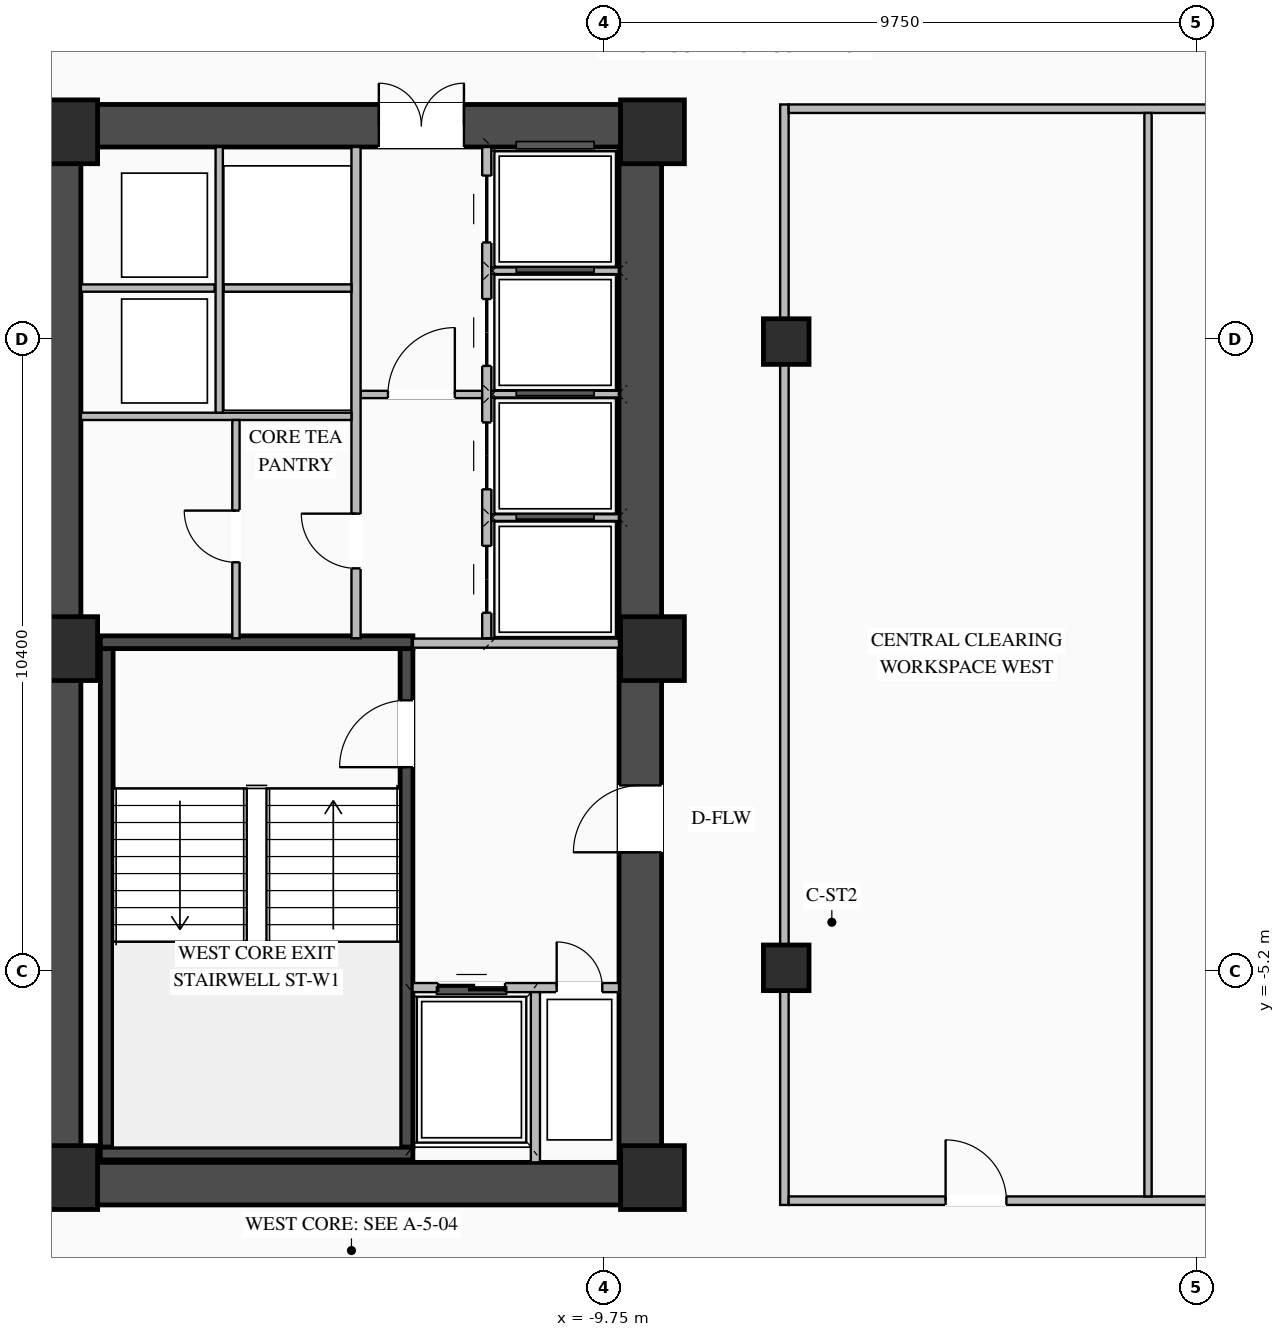
"""IFC4 building model, lengths in metres.
Left out: names, types, materials, properties, quantities, classifications, styles, units other than length and angle.
Written with IfcOpenShell. Run it as: python <this file> out.ifc"""

import sys

from ifc_helpers import new_model, si_unit, direction, frame, frame_2d, origin, origin_2d, place, context, subcontext, project, spatial, rectangle, i_section, extrude, element, fill, save


model = new_model("IFC4")
c1 = context("Model", 3, precision=1e-05, world=origin(), true_north=direction((0.0, 1.0)))
c2 = subcontext(c1, "Body", "Model", "MODEL_VIEW")
j1 = project(units=[si_unit("LENGTHUNIT", "METRE"), si_unit("PLANEANGLEUNIT", "RADIAN")], contexts=[c1])
p1 = place(None, origin())
s1 = spatial("IfcSite", under=j1, at=p1, CompositionType="ELEMENT")
p2 = place(p1, origin())
s2 = spatial("IfcBuilding", under=s1, at=p2, CompositionType="ELEMENT")
p3 = place(p2, frame((0.0, 0.0, 84.55)))
s3 = spatial("IfcBuildingStorey", under=s2, at=p3, CompositionType="ELEMENT", Elevation=84.55)
p4 = place(p3, frame((-19.05, -8.7, 0.0), z_axis=(0.0, 0.0, 1.0), x_axis=(1.0, 0.0, 0.0)))
e1 = element("IfcWall", 1, at=p4, inside=s3, PredefinedType="SHEAR", context=c2, shape_type="SweptSolid", body=[
    extrude(rectangle(XDim=10.25, YDim=0.7, at=frame_2d((5.125, 0.0))), origin(), (0.0, 0.0, 1.0), 3.27),
])
p5 = place(p3, frame((-19.05, 8.7, 0.0), z_axis=(0.0, 0.0, 1.0), x_axis=(1.0, 0.0, 0.0)))
e2 = element("IfcWall", 2, at=p5, inside=s3, PredefinedType="SHEAR", context=c2, shape_type="SweptSolid", body=[
    extrude(rectangle(XDim=10.25, YDim=0.7, at=frame_2d((5.125, 0.0))), origin(), (0.0, 0.0, 1.0), 3.27),
])
p6 = place(p5, frame((5.6, 0.0, 0.0)))
e3 = element("IfcOpeningElement", 3, at=p6, cuts=e2, PredefinedType="OPENING", context=c2, shape_type="SweptSolid", body=[
    extrude(rectangle(XDim=1.4, YDim=2.05, at=frame_2d((0.7, 1.025))), frame((0.0, 0.36, 0.0), z_axis=(0.0, -1.0, 0.0), x_axis=(1.0, 0.0, 0.0)), (0.0, 0.0, 1.0), 0.72),
])
p7 = place(p3, frame((-18.7, -8.35, 0.0), z_axis=(0.0, 0.0, 1.0), x_axis=(0.0, 1.0, 0.0)))
e4 = element("IfcWall", 4, at=p7, inside=s3, PredefinedType="SHEAR", context=c2, shape_type="SweptSolid", body=[
    extrude(rectangle(XDim=16.7, YDim=0.7, at=frame_2d((8.35, 0.0))), origin(), (0.0, 0.0, 1.0), 3.27),
])
p8 = place(p3, frame((-9.15, -8.35, 0.0), z_axis=(0.0, 0.0, 1.0), x_axis=(0.0, 1.0, 0.0)))
e5 = element("IfcWall", 5, at=p8, inside=s3, PredefinedType="SHEAR", context=c2, shape_type="SweptSolid", body=[
    extrude(rectangle(XDim=16.7, YDim=0.7, at=frame_2d((8.35, 0.0))), origin(), (0.0, 0.0, 1.0), 3.27),
])
p9 = place(p8, frame((5.1, 0.0, 0.0)))
e6 = element("IfcOpeningElement", 6, at=p9, cuts=e5, PredefinedType="OPENING", context=c2, shape_type="SweptSolid", body=[
    extrude(rectangle(XDim=1.1, YDim=2.08, at=frame_2d((0.55, 1.04))), frame((0.0, 0.36, 0.0), z_axis=(0.0, -1.0, 0.0), x_axis=(1.0, 0.0, 0.0)), (0.0, 0.0, 1.0), 0.72),
])
p10 = place(p3, frame((-12.995, -8.1, 0.0), z_axis=(0.0, 0.0, 1.0), x_axis=(0.0, 1.0, 0.0)))
e7 = element("IfcWall", 7, at=p10, inside=s3, PredefinedType="SHEAR", context=c2, shape_type="SweptSolid", body=[
    extrude(rectangle(XDim=8.2, YDim=0.21, at=frame_2d((4.1, 0.0))), origin(), (0.0, 0.0, 1.0), 3.27),
])
p11 = place(p10, frame((6.25, 0.0, 0.0)))
e8 = element("IfcOpeningElement", 8, at=p11, cuts=e7, PredefinedType="OPENING", context=c2, shape_type="SweptSolid", body=[
    extrude(rectangle(XDim=1.1, YDim=2.15, at=frame_2d((0.55, 1.075))), frame((0.0, 0.115, 0.0), z_axis=(0.0, -1.0, 0.0), x_axis=(1.0, 0.0, 0.0)), (0.0, 0.0, 1.0), 0.23),
])
p12 = place(p3, frame((-17.925, -8.1, 0.0), z_axis=(0.0, 0.0, 1.0), x_axis=(0.0, 1.0, 0.0)))
e9 = element("IfcWall", 9, at=p12, inside=s3, PredefinedType="SHEAR", context=c2, shape_type="SweptSolid", body=[
    extrude(rectangle(XDim=8.2, YDim=0.21, at=frame_2d((4.1, 0.0))), origin(), (0.0, 0.0, 1.0), 3.27),
])
for number, where, z_axis, x_axis in (
    (10, (-18.03, -8.205, 0.0), (0.0, 0.0, 1.0), (1.0, 0.0, 0.0)),
    (11, (-12.89, 0.205, 0.0), (0.0, 0.0, 1.0), (-1.0, 0.0, 0.0)),
):
    element("IfcWall", number, at=place(p3, frame(where, z_axis=z_axis, x_axis=x_axis)), inside=s3, PredefinedType="SHEAR", context=c2, shape_type="SweptSolid", body=[
        extrude(rectangle(XDim=5.14, YDim=0.21, at=frame_2d((2.57, 0.0))), origin(), (0.0, 0.0, 1.0), 3.27),
    ])
for number, where, z_axis, x_axis in (
    (12, (-8.95, -8.6, 0.0), (0.0, 0.0, 1.0), (1.0, 0.0, 0.0)),
    (13, (-8.95, 0.1, 0.0), (0.0, 0.0, 1.0), (1.0, 0.0, 0.0)),
    (14, (-8.95, 8.6, 0.0), (0.0, 0.0, 1.0), (1.0, 0.0, 0.0)),
    (15, (-18.6, -8.6, 0.0), (0.0, 0.0, 1.0), (1.0, 0.0, 0.0)),
    (16, (-18.6, 0.1, 0.0), (0.0, 0.0, 1.0), (1.0, 0.0, 0.0)),
    (17, (-18.6, 8.6, 0.0), (0.0, 0.0, 1.0), (1.0, 0.0, 0.0)),
):
    element("IfcColumn", number, at=place(p3, frame(where, z_axis=z_axis, x_axis=x_axis)), inside=s3, PredefinedType="COLUMN", context=c2, shape_type="SweptSolid", body=[
        extrude(rectangle(XDim=1.05, YDim=1.05, at=origin_2d()), origin(), (0.0, 0.0, 1.0), 3.45),
    ])
for number, where, z_axis, x_axis in (
    (18, (-6.75, -5.15, 0.0), (0.0, 0.0, 1.0), (1.0, 0.0, 0.0)),
    (19, (-6.75, 5.15, 0.0), (0.0, 0.0, 1.0), (1.0, 0.0, 0.0)),
):
    element("IfcColumn", number, at=place(p3, frame(where, z_axis=z_axis, x_axis=x_axis)), inside=s3, PredefinedType="COLUMN", context=c2, shape_type="SweptSolid", body=[
        extrude(i_section(OverallWidth=0.75, OverallDepth=0.75, WebThickness=0.03, FlangeThickness=0.044, at=origin_2d()), origin(), (0.0, 0.0, 1.0), 3.45),
    ])
p13 = place(p3, frame((-12.895, -5.475, 0.0), z_axis=(0.0, 0.0, 1.0), x_axis=(1.0, 0.0, 0.0)))
e20 = element("IfcWall", 20, at=p13, inside=s3, PredefinedType="STANDARD", context=c2, shape_type="SweptSolid", body=[
    extrude(rectangle(XDim=3.395, YDim=0.15, at=frame_2d((1.698, 0.0))), origin(), (0.0, 0.0, 1.0), 3.25),
])
p14 = place(p13, frame((0.42, 0.0, 0.0)))
e21 = element("IfcOpeningElement", 21, at=p14, cuts=e20, PredefinedType="OPENING", context=c2, shape_type="SweptSolid", body=[
    extrude(rectangle(XDim=1.1, YDim=2.15, at=frame_2d((0.55, 1.075))), frame((0.0, 0.085, 0.0), z_axis=(0.0, -1.0, 0.0), x_axis=(1.0, 0.0, 0.0)), (0.0, 0.0, 1.0), 0.17),
])
p15 = place(p13, frame((2.37, 0.0, 0.0)))
e22 = element("IfcOpeningElement", 22, at=p15, cuts=e20, PredefinedType="OPENING", context=c2, shape_type="SweptSolid", body=[
    extrude(rectangle(XDim=0.75, YDim=2.05, at=frame_2d((0.375, 1.025))), frame((0.0, 0.085, 0.0), z_axis=(0.0, -1.0, 0.0), x_axis=(1.0, 0.0, 0.0)), (0.0, 0.0, 1.0), 0.17),
])
p16 = place(p3, frame((-10.875, -8.35, 0.0), z_axis=(0.0, 0.0, 1.0), x_axis=(0.0, 1.0, 0.0)))
e23 = element("IfcWall", 23, at=p16, inside=s3, PredefinedType="STANDARD", context=c2, shape_type="SweptSolid", body=[
    extrude(rectangle(XDim=2.8, YDim=0.15, at=frame_2d((1.4, 0.0))), origin(), (0.0, 0.0, 1.0), 3.25),
])
p17 = place(p3, frame((-12.89, 0.19, 0.0), z_axis=(0.0, 0.0, 1.0), x_axis=(1.0, 0.0, 0.0)))
e24 = element("IfcWall", 24, at=p17, inside=s3, PredefinedType="STANDARD", context=c2, shape_type="SweptSolid", body=[
    extrude(rectangle(XDim=3.39, YDim=0.15, at=frame_2d((1.695, 0.0))), origin(), (0.0, 0.0, 1.0), 2.645),
])
p18 = place(p3, frame((-13.75, 4.28, 0.0), z_axis=(0.0, 0.0, 1.0), x_axis=(1.0, 0.0, 0.0)))
e25 = element("IfcWall", 25, at=p18, inside=s3, PredefinedType="STANDARD", context=c2, shape_type="SweptSolid", body=[
    extrude(rectangle(XDim=2.0, YDim=0.12, at=frame_2d((1.0, 0.0))), origin(), (0.0, 0.0, 1.0), 3.25),
])
p19 = place(p18, frame((0.45, 0.0, 0.0)))
e26 = element("IfcOpeningElement", 26, at=p19, cuts=e25, PredefinedType="OPENING", context=c2, shape_type="SweptSolid", body=[
    extrude(rectangle(XDim=1.1, YDim=2.1, at=frame_2d((0.55, 1.05))), frame((0.0, 0.07, 0.0), z_axis=(0.0, -1.0, 0.0), x_axis=(1.0, 0.0, 0.0)), (0.0, 0.0, 1.0), 0.14),
])
p20 = place(p3, frame((-11.675, 0.27, 0.0), z_axis=(0.0, 0.0, 1.0), x_axis=(0.0, 1.0, 0.0)))
e27 = element("IfcWall", 27, at=p20, inside=s3, PredefinedType="STANDARD", context=c2, shape_type="SweptSolid", body=[
    extrude(rectangle(XDim=8.08, YDim=0.15, at=frame_2d((4.04, 0.0))), origin(), (0.0, 0.0, 1.0), 3.25),
])
p21 = place(p20, frame((0.42, 0.0, 0.0)))
e28 = element("IfcOpeningElement", 28, at=p21, cuts=e27, PredefinedType="OPENING", context=c2, shape_type="SweptSolid", body=[
    extrude(rectangle(XDim=1.1, YDim=2.1, at=frame_2d((0.55, 1.05))), frame((0.0, 0.085, 0.0), z_axis=(0.0, -1.0, 0.0), x_axis=(1.0, 0.0, 0.0)), (0.0, 0.0, 1.0), 0.17),
])
p22 = place(p20, frame((2.45, 0.0, 0.0)))
e29 = element("IfcOpeningElement", 29, at=p22, cuts=e27, PredefinedType="OPENING", context=c2, shape_type="SweptSolid", body=[
    extrude(rectangle(XDim=1.1, YDim=2.1, at=frame_2d((0.55, 1.05))), frame((0.0, 0.085, 0.0), z_axis=(0.0, -1.0, 0.0), x_axis=(1.0, 0.0, 0.0)), (0.0, 0.0, 1.0), 0.17),
])
p23 = place(p20, frame((4.48, 0.0, 0.0)))
e30 = element("IfcOpeningElement", 30, at=p23, cuts=e27, PredefinedType="OPENING", context=c2, shape_type="SweptSolid", body=[
    extrude(rectangle(XDim=1.1, YDim=2.1, at=frame_2d((0.55, 1.05))), frame((0.0, 0.085, 0.0), z_axis=(0.0, -1.0, 0.0), x_axis=(1.0, 0.0, 0.0)), (0.0, 0.0, 1.0), 0.17),
])
p24 = place(p20, frame((6.51, 0.0, 0.0)))
e31 = element("IfcOpeningElement", 31, at=p24, cuts=e27, PredefinedType="OPENING", context=c2, shape_type="SweptSolid", body=[
    extrude(rectangle(XDim=1.1, YDim=2.1, at=frame_2d((0.55, 1.05))), frame((0.0, 0.085, 0.0), z_axis=(0.0, -1.0, 0.0), x_axis=(1.0, 0.0, 0.0)), (0.0, 0.0, 1.0), 0.17),
])
for number, where, z_axis, x_axis in (
    (32, (-11.6, 2.255, 0.0), (0.0, 0.0, 1.0), (1.0, 0.0, 0.0)),
    (33, (-11.6, 4.285, 0.0), (0.0, 0.0, 1.0), (1.0, 0.0, 0.0)),
    (34, (-11.6, 6.315, 0.0), (0.0, 0.0, 1.0), (1.0, 0.0, 0.0)),
):
    element("IfcWall", number, at=place(p3, frame(where, z_axis=z_axis, x_axis=x_axis)), inside=s3, PredefinedType="STANDARD", context=c2, shape_type="SweptSolid", body=[
        extrude(rectangle(XDim=2.1, YDim=0.11, at=frame_2d((1.05, 0.0))), origin(), (0.0, 0.0, 1.0), 3.25),
    ])
p25 = place(p3, frame((-13.825, 0.27, 0.0), z_axis=(0.0, 0.0, 1.0), x_axis=(0.0, 1.0, 0.0)))
e35 = element("IfcWall", 35, at=p25, inside=s3, PredefinedType="STANDARD", context=c2, shape_type="SweptSolid", body=[
    extrude(rectangle(XDim=8.08, YDim=0.15, at=frame_2d((4.04, 0.0))), origin(), (0.0, 0.0, 1.0), 3.25),
])
p26 = place(p25, frame((1.15, 0.0, 0.0)))
e36 = element("IfcOpeningElement", 36, at=p26, cuts=e35, PredefinedType="OPENING", context=c2, shape_type="SweptSolid", body=[
    extrude(rectangle(XDim=0.9, YDim=2.05, at=frame_2d((0.45, 1.025))), frame((0.0, 0.085, 0.0), z_axis=(0.0, -1.0, 0.0), x_axis=(1.0, 0.0, 0.0)), (0.0, 0.0, 1.0), 0.17),
])
p27 = place(p3, frame((-18.35, 3.92, 0.0), z_axis=(0.0, 0.0, 1.0), x_axis=(1.0, 0.0, 0.0)))
e37 = element("IfcWall", 37, at=p27, inside=s3, PredefinedType="STANDARD", context=c2, shape_type="SweptSolid", body=[
    extrude(rectangle(XDim=4.45, YDim=0.12, at=frame_2d((2.225, 0.0))), origin(), (0.0, 0.0, 1.0), 3.25),
])
p28 = place(p3, frame((-18.35, 6.03, 0.0), z_axis=(0.0, 0.0, 1.0), x_axis=(1.0, 0.0, 0.0)))
e38 = element("IfcWall", 38, at=p28, inside=s3, PredefinedType="STANDARD", context=c2, shape_type="SweptSolid", body=[
    extrude(rectangle(XDim=2.2, YDim=0.12, at=frame_2d((1.1, 0.0))), origin(), (0.0, 0.0, 1.0), 3.25),
])
p29 = place(p3, frame((-16.075, 3.98, 0.0), z_axis=(0.0, 0.0, 1.0), x_axis=(0.0, 1.0, 0.0)))
e39 = element("IfcWall", 39, at=p29, inside=s3, PredefinedType="STANDARD", context=c2, shape_type="SweptSolid", body=[
    extrude(rectangle(XDim=4.37, YDim=0.12, at=frame_2d((2.185, 0.0))), origin(), (0.0, 0.0, 1.0), 3.25),
])
p30 = place(p3, frame((-16.0, 6.03, 0.0), z_axis=(0.0, 0.0, 1.0), x_axis=(1.0, 0.0, 0.0)))
e40 = element("IfcWall", 40, at=p30, inside=s3, PredefinedType="STANDARD", context=c2, shape_type="SweptSolid", body=[
    extrude(rectangle(XDim=2.1, YDim=0.12, at=frame_2d((1.05, 0.0))), origin(), (0.0, 0.0, 1.0), 3.25),
])
p31 = place(p3, frame((-15.8, 0.27, 0.0), z_axis=(0.0, 0.0, 1.0), x_axis=(0.0, 1.0, 0.0)))
e41 = element("IfcWall", 41, at=p31, inside=s3, PredefinedType="STANDARD", context=c2, shape_type="SweptSolid", body=[
    extrude(rectangle(XDim=3.59, YDim=0.12, at=frame_2d((1.795, 0.0))), origin(), (0.0, 0.0, 1.0), 3.25),
])
p32 = place(p31, frame((1.25, 0.0, 0.0)))
e42 = element("IfcOpeningElement", 42, at=p32, cuts=e41, PredefinedType="OPENING", context=c2, shape_type="SweptSolid", body=[
    extrude(rectangle(XDim=0.85, YDim=2.05, at=frame_2d((0.425, 1.025))), frame((0.0, 0.07, 0.0), z_axis=(0.0, -1.0, 0.0), x_axis=(1.0, 0.0, 0.0)), (0.0, 0.0, 1.0), 0.14),
])
p33 = place(p3, frame((-6.78, -9.05, 0.0), z_axis=(0.0, 0.0, 1.0), x_axis=(0.0, 1.0, 0.0)))
e43 = element("IfcWall", 43, at=p33, inside=s3, PredefinedType="STANDARD", context=c2, shape_type="SweptSolid", body=[
    extrude(rectangle(XDim=18.1, YDim=0.14, at=frame_2d((9.05, 0.0))), origin(), (0.0, 0.0, 1.0), 2.645),
])
p34 = place(p3, frame((-6.71, -8.98, 0.0), z_axis=(0.0, 0.0, 1.0), x_axis=(1.0, 0.0, 0.0)))
e44 = element("IfcWall", 44, at=p34, inside=s3, PredefinedType="STANDARD", context=c2, shape_type="SweptSolid", body=[
    extrude(rectangle(XDim=13.42, YDim=0.14, at=frame_2d((6.71, 0.0))), origin(), (0.0, 0.0, 1.0), 3.25),
])
p35 = place(p34, frame((2.581, 0.0, 0.0)))
e45 = element("IfcOpeningElement", 45, at=p35, cuts=e44, PredefinedType="OPENING", context=c2, shape_type="SweptSolid", body=[
    extrude(rectangle(XDim=1.0, YDim=2.08, at=frame_2d((0.5, 1.04))), frame((0.0, 0.08, 0.0), z_axis=(0.0, -1.0, 0.0), x_axis=(1.0, 0.0, 0.0)), (0.0, 0.0, 1.0), 0.16),
])
p36 = place(p34, frame((9.039, 0.0, 0.0)))
e46 = element("IfcOpeningElement", 46, at=p36, cuts=e44, PredefinedType="OPENING", context=c2, shape_type="SweptSolid", body=[
    extrude(rectangle(XDim=1.0, YDim=2.08, at=frame_2d((0.5, 1.04))), frame((0.0, 0.08, 0.0), z_axis=(0.0, -1.0, 0.0), x_axis=(1.0, 0.0, 0.0)), (0.0, 0.0, 1.0), 0.16),
])
p37 = place(p3, frame((-6.71, 8.98, 0.0), z_axis=(0.0, 0.0, 1.0), x_axis=(1.0, 0.0, 0.0)))
e47 = element("IfcWall", 47, at=p37, inside=s3, PredefinedType="STANDARD", context=c2, shape_type="SweptSolid", body=[
    extrude(rectangle(XDim=13.42, YDim=0.14, at=frame_2d((6.71, 0.0))), origin(), (0.0, 0.0, 1.0), 3.25),
])
p38 = place(p3, frame((-0.8, -8.91, 0.0), z_axis=(0.0, 0.0, 1.0), x_axis=(0.0, 1.0, 0.0)))
e48 = element("IfcWall", 48, at=p38, inside=s3, PredefinedType="STANDARD", context=c2, shape_type="SweptSolid", body=[
    extrude(rectangle(XDim=17.82, YDim=0.12, at=frame_2d((8.91, 0.0))), origin(), (0.0, 0.0, 1.0), 3.25),
])
p39 = place(p11, origin())
e49 = element("IfcDoor", 49, at=p39, inside=s3, OperationType="SINGLE_SWING_LEFT", PredefinedType="DOOR", context=c2, shape_type="SweptSolid", body=[
    extrude(rectangle(XDim=1.1, YDim=2.15, at=frame_2d((0.55, 1.075))), frame((0.0, 0.025, 0.0), z_axis=(0.0, -1.0, 0.0), x_axis=(1.0, 0.0, 0.0)), (0.0, 0.0, 1.0), 0.05),
])
fill(e8, e49)
p40 = place(p14, origin())
e50 = element("IfcDoor", 50, at=p40, inside=s3, OperationType="DOUBLE_DOOR_SLIDING", PredefinedType="DOOR", context=c2, shape_type="SweptSolid", body=[
    extrude(rectangle(XDim=1.1, YDim=2.15, at=frame_2d((0.55, 1.075))), frame((0.0, 0.025, 0.0), z_axis=(0.0, -1.0, 0.0), x_axis=(1.0, 0.0, 0.0)), (0.0, 0.0, 1.0), 0.05),
])
fill(e21, e50)
p41 = place(p15, origin())
e51 = element("IfcDoor", 51, at=p41, inside=s3, OperationType="SINGLE_SWING_LEFT", PredefinedType="DOOR", context=c2, shape_type="SweptSolid", body=[
    extrude(rectangle(XDim=0.75, YDim=2.05, at=frame_2d((0.375, 1.025))), frame((0.0, 0.025, 0.0), z_axis=(0.0, -1.0, 0.0), x_axis=(1.0, 0.0, 0.0)), (0.0, 0.0, 1.0), 0.05),
])
fill(e22, e51)
p42 = place(p9, origin())
e52 = element("IfcDoor", 52, at=p42, inside=s3, OperationType="SINGLE_SWING_LEFT", PredefinedType="DOOR", context=c2, shape_type="SweptSolid", body=[
    extrude(rectangle(XDim=1.1, YDim=2.08, at=frame_2d((0.55, 1.04))), frame((0.0, 0.305, 0.0), z_axis=(0.0, -1.0, 0.0), x_axis=(1.0, 0.0, 0.0)), (0.0, 0.0, 1.0), 0.05),
])
fill(e6, e52)
p43 = place(p19, origin())
e53 = element("IfcDoor", 53, at=p43, inside=s3, OperationType="SINGLE_SWING_RIGHT", PredefinedType="DOOR", context=c2, shape_type="SweptSolid", body=[
    extrude(rectangle(XDim=1.1, YDim=2.1, at=frame_2d((0.55, 1.05))), frame((0.0, 0.025, 0.0), z_axis=(0.0, -1.0, 0.0), x_axis=(1.0, 0.0, 0.0)), (0.0, 0.0, 1.0), 0.05),
])
fill(e26, e53)
p44 = place(p6, origin())
e54 = element("IfcDoor", 54, at=p44, inside=s3, OperationType="DOUBLE_DOOR_SINGLE_SWING", PredefinedType="DOOR", context=c2, shape_type="SweptSolid", body=[
    extrude(rectangle(XDim=1.4, YDim=2.05, at=frame_2d((0.7, 1.025))), frame((0.0, 0.295, 0.0), z_axis=(0.0, -1.0, 0.0), x_axis=(1.0, 0.0, 0.0)), (0.0, 0.0, 1.0), 0.05),
])
fill(e3, e54)
p45 = place(p21, origin())
e55 = element("IfcDoor", 55, at=p45, inside=s3, OperationType="DOUBLE_DOOR_SLIDING", PredefinedType="DOOR", context=c2, shape_type="SweptSolid", body=[
    extrude(rectangle(XDim=1.1, YDim=2.1, at=frame_2d((0.55, 1.05))), frame((0.0, 0.025, 0.0), z_axis=(0.0, -1.0, 0.0), x_axis=(1.0, 0.0, 0.0)), (0.0, 0.0, 1.0), 0.05),
])
fill(e28, e55)
p46 = place(p22, origin())
e56 = element("IfcDoor", 56, at=p46, inside=s3, OperationType="DOUBLE_DOOR_SLIDING", PredefinedType="DOOR", context=c2, shape_type="SweptSolid", body=[
    extrude(rectangle(XDim=1.1, YDim=2.1, at=frame_2d((0.55, 1.05))), frame((0.0, 0.025, 0.0), z_axis=(0.0, -1.0, 0.0), x_axis=(1.0, 0.0, 0.0)), (0.0, 0.0, 1.0), 0.05),
])
fill(e29, e56)
p47 = place(p23, origin())
e57 = element("IfcDoor", 57, at=p47, inside=s3, OperationType="DOUBLE_DOOR_SLIDING", PredefinedType="DOOR", context=c2, shape_type="SweptSolid", body=[
    extrude(rectangle(XDim=1.1, YDim=2.1, at=frame_2d((0.55, 1.05))), frame((0.0, 0.025, 0.0), z_axis=(0.0, -1.0, 0.0), x_axis=(1.0, 0.0, 0.0)), (0.0, 0.0, 1.0), 0.05),
])
fill(e30, e57)
p48 = place(p24, origin())
e58 = element("IfcDoor", 58, at=p48, inside=s3, OperationType="DOUBLE_DOOR_SLIDING", PredefinedType="DOOR", context=c2, shape_type="SweptSolid", body=[
    extrude(rectangle(XDim=1.1, YDim=2.1, at=frame_2d((0.55, 1.05))), frame((0.0, 0.025, 0.0), z_axis=(0.0, -1.0, 0.0), x_axis=(1.0, 0.0, 0.0)), (0.0, 0.0, 1.0), 0.05),
])
fill(e31, e58)
p49 = place(p26, origin())
e59 = element("IfcDoor", 59, at=p49, inside=s3, OperationType="SINGLE_SWING_RIGHT", PredefinedType="DOOR", context=c2, shape_type="SweptSolid", body=[
    extrude(rectangle(XDim=0.9, YDim=2.05, at=frame_2d((0.45, 1.025))), frame((0.0, 0.025, 0.0), z_axis=(0.0, -1.0, 0.0), x_axis=(1.0, 0.0, 0.0)), (0.0, 0.0, 1.0), 0.05),
])
fill(e36, e59)
p50 = place(p32, origin())
e60 = element("IfcDoor", 60, at=p50, inside=s3, OperationType="SINGLE_SWING_RIGHT", PredefinedType="DOOR", context=c2, shape_type="SweptSolid", body=[
    extrude(rectangle(XDim=0.85, YDim=2.05, at=frame_2d((0.425, 1.025))), frame((0.0, 0.025, 0.0), z_axis=(0.0, -1.0, 0.0), x_axis=(1.0, 0.0, 0.0)), (0.0, 0.0, 1.0), 0.05),
])
fill(e42, e60)
p51 = place(p35, origin())
e61 = element("IfcDoor", 61, at=p51, inside=s3, OperationType="SINGLE_SWING_LEFT", PredefinedType="DOOR", context=c2, shape_type="SweptSolid", body=[
    extrude(rectangle(XDim=1.0, YDim=2.08, at=frame_2d((0.5, 1.04))), frame((0.0, 0.025, 0.0), z_axis=(0.0, -1.0, 0.0), x_axis=(1.0, 0.0, 0.0)), (0.0, 0.0, 1.0), 0.05),
])
fill(e45, e61)
save(model, sys.argv[1])
